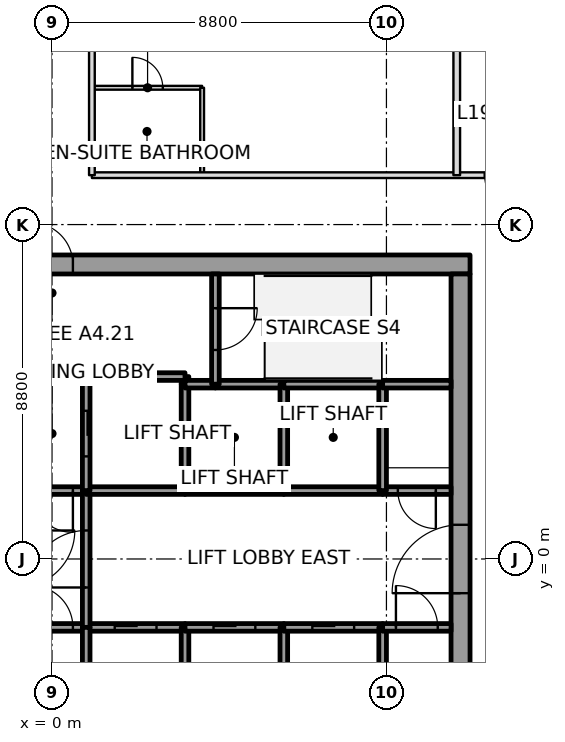
"""IFC4 building model, lengths in metres.
Left out: names, types, materials, properties, quantities, classifications, styles, units other than length and angle.
Written with IfcOpenShell. Run it as: python <this file> out.ifc"""

import sys

from ifc_helpers import new_model, si_unit, direction, frame, frame_2d, origin, place, context, subcontext, project, spatial, rectangle, extrude, element, fill, save


model = new_model("IFC4")
c1 = context("Model", 3, precision=1e-05, world=origin(), true_north=direction((0.0, 1.0)))
c2 = subcontext(c1, "Body", "Model", "MODEL_VIEW")
j1 = project(units=[si_unit("LENGTHUNIT", "METRE"), si_unit("PLANEANGLEUNIT", "RADIAN")], contexts=[c1])
p1 = place(None, origin())
s1 = spatial("IfcSite", under=j1, at=p1, CompositionType="ELEMENT")
p2 = place(p1, origin())
s2 = spatial("IfcBuilding", under=s1, at=p2, CompositionType="ELEMENT")
p3 = place(p2, frame((0.0, 0.0, 92.4)))
s3 = spatial("IfcBuildingStorey", under=s2, at=p3, CompositionType="ELEMENT", Elevation=92.4)
p4 = place(p3, frame((-11.0, 7.75, 0.0), z_axis=(0.0, 0.0, 1.0), x_axis=(1.0, 0.0, 0.0)))
e1 = element("IfcWall", 1, at=p4, inside=s3, PredefinedType="SHEAR", context=c2, shape_type="SweptSolid", body=[
    extrude(rectangle(XDim=22.0, YDim=0.5, at=frame_2d((11.0, 0.0))), origin(), (0.0, 0.0, 1.0), 3.7),
])
p5 = place(p4, frame((10.45, 0.0, 0.0)))
e2 = element("IfcOpeningElement", 2, at=p5, cuts=e1, PredefinedType="OPENING", context=c2, shape_type="SweptSolid", body=[
    extrude(rectangle(XDim=1.1, YDim=2.1, at=frame_2d((0.55, 1.05))), frame((0.0, 0.25, 0.0), z_axis=(0.0, -1.0, 0.0), x_axis=(1.0, 0.0, 0.0)), (0.0, 0.0, 1.0), 0.5),
])
p6 = place(p3, frame((10.75, -7.5, 0.0), z_axis=(0.0, 0.0, 1.0), x_axis=(0.0, 1.0, 0.0)))
e3 = element("IfcWall", 3, at=p6, inside=s3, PredefinedType="SHEAR", context=c2, shape_type="SweptSolid", body=[
    extrude(rectangle(XDim=15.0, YDim=0.5, at=frame_2d((7.5, 0.0))), origin(), (0.0, 0.0, 1.0), 3.7),
])
p7 = place(p6, frame((6.6, 0.0, 0.0)))
e4 = element("IfcOpeningElement", 4, at=p7, cuts=e3, PredefinedType="OPENING", context=c2, shape_type="SweptSolid", body=[
    extrude(rectangle(XDim=1.8, YDim=2.1, at=frame_2d((0.9, 1.05))), frame((0.0, 0.25, 0.0), z_axis=(0.0, -1.0, 0.0), x_axis=(1.0, 0.0, 0.0)), (0.0, 0.0, 1.0), 0.5),
])
p8 = place(p3, frame((-0.9, -1.8, 0.0), z_axis=(0.0, 0.0, 1.0), x_axis=(1.0, 0.0, 0.0)))
e5 = element("IfcWall", 5, at=p8, inside=s3, PredefinedType="SOLIDWALL", context=c2, shape_type="SweptSolid", body=[
    extrude(rectangle(XDim=1.8, YDim=0.2, at=frame_2d((0.9, 0.0))), origin(), (0.0, 0.0, 1.0), 3.55),
])
p9 = place(p8, frame((0.35, 0.0, 0.0)))
e6 = element("IfcOpeningElement", 6, at=p9, cuts=e5, PredefinedType="OPENING", context=c2, shape_type="SweptSolid", body=[
    extrude(rectangle(XDim=1.1, YDim=2.1, at=frame_2d((0.55, 1.05))), frame((0.0, 0.1, 0.0), z_axis=(0.0, -1.0, 0.0), x_axis=(1.0, 0.0, 0.0)), (0.0, 0.0, 1.0), 0.2),
])
p10 = place(p3, frame((0.9, 1.8, 0.0), z_axis=(0.0, 0.0, 1.0), x_axis=(-1.0, 0.0, 0.0)))
e7 = element("IfcWall", 7, at=p10, inside=s3, PredefinedType="SOLIDWALL", context=c2, shape_type="SweptSolid", body=[
    extrude(rectangle(XDim=1.8, YDim=0.2, at=frame_2d((0.9, 0.0))), origin(), (0.0, 0.0, 1.0), 3.55),
])
p11 = place(p10, frame((0.35, 0.0, 0.0)))
e8 = element("IfcOpeningElement", 8, at=p11, cuts=e7, PredefinedType="OPENING", context=c2, shape_type="SweptSolid", body=[
    extrude(rectangle(XDim=1.1, YDim=2.1, at=frame_2d((0.55, 1.05))), frame((0.0, 0.1, 0.0), z_axis=(0.0, -1.0, 0.0), x_axis=(1.0, 0.0, 0.0)), (0.0, 0.0, 1.0), 0.2),
])
p12 = place(p3, frame((0.9, -1.8, 0.0), z_axis=(0.0, 0.0, 1.0), x_axis=(1.0, 0.0, 0.0)))
e9 = element("IfcWall", 9, at=p12, inside=s3, PredefinedType="SOLIDWALL", context=c2, shape_type="SweptSolid", body=[
    extrude(rectangle(XDim=2.6, YDim=0.2, at=frame_2d((1.3, 0.0))), origin(), (0.0, 0.0, 1.0), 3.55),
])
p13 = place(p12, frame((0.75, 0.0, 0.0)))
e10 = element("IfcOpeningElement", 10, at=p13, cuts=e9, PredefinedType="OPENING", context=c2, shape_type="SweptSolid", body=[
    extrude(rectangle(XDim=1.1, YDim=2.1, at=frame_2d((0.55, 1.05))), frame((0.0, 0.1, 0.0), z_axis=(0.0, -1.0, 0.0), x_axis=(1.0, 0.0, 0.0)), (0.0, 0.0, 1.0), 0.2),
])
p14 = place(p3, frame((0.9, -1.8, 0.0), z_axis=(0.0, 0.0, 1.0), x_axis=(0.0, 1.0, 0.0)))
e11 = element("IfcWall", 11, at=p14, inside=s3, PredefinedType="SOLIDWALL", context=c2, shape_type="SweptSolid", body=[
    extrude(rectangle(XDim=3.6, YDim=0.2, at=frame_2d((1.8, 0.0))), origin(), (0.0, 0.0, 1.0), 3.55),
])
p15 = place(p14, frame((1.05, 0.0, 0.0)))
e12 = element("IfcOpeningElement", 12, at=p15, cuts=e11, PredefinedType="OPENING", context=c2, shape_type="SweptSolid", body=[
    extrude(rectangle(XDim=1.5, YDim=2.1, at=frame_2d((0.75, 1.05))), frame((0.0, 0.1, 0.0), z_axis=(0.0, -1.0, 0.0), x_axis=(1.0, 0.0, 0.0)), (0.0, 0.0, 1.0), 0.2),
])
p16 = place(p3, frame((0.9, -1.8, 0.0), z_axis=(0.0, 0.0, 1.0), x_axis=(0.0, -1.0, 0.0)))
e13 = element("IfcWall", 13, at=p16, inside=s3, PredefinedType="SOLIDWALL", context=c2, shape_type="SweptSolid", body=[
    extrude(rectangle(XDim=2.8, YDim=0.2, at=frame_2d((1.4, 0.0))), origin(), (0.0, 0.0, 1.0), 3.55),
])
p17 = place(p3, frame((3.5, 1.8, 0.0), z_axis=(0.0, 0.0, 1.0), x_axis=(-1.0, 0.0, 0.0)))
e14 = element("IfcWall", 14, at=p17, inside=s3, PredefinedType="SOLIDWALL", context=c2, shape_type="SweptSolid", body=[
    extrude(rectangle(XDim=2.6, YDim=0.2, at=frame_2d((1.3, 0.0))), origin(), (0.0, 0.0, 1.0), 3.55),
])
p18 = place(p3, frame((3.5, 4.6, 0.0), z_axis=(0.0, 0.0, 1.0), x_axis=(0.0, 1.0, 0.0)))
e15 = element("IfcWall", 15, at=p18, inside=s3, PredefinedType="SOLIDWALL", context=c2, shape_type="SweptSolid", body=[
    extrude(rectangle(XDim=0.2, YDim=0.2, at=frame_2d((0.1, 0.0))), origin(), (0.0, 0.0, 1.0), 3.55),
])
p19 = place(p3, frame((3.5, 4.8, 0.0), z_axis=(0.0, 0.0, 1.0), x_axis=(-1.0, 0.0, 0.0)))
e16 = element("IfcWall", 16, at=p19, inside=s3, PredefinedType="SOLIDWALL", context=c2, shape_type="SweptSolid", body=[
    extrude(rectangle(XDim=2.6, YDim=0.2, at=frame_2d((1.3, 0.0))), origin(), (0.0, 0.0, 1.0), 3.55),
])
p20 = place(p3, frame((0.9, 4.8, 0.0), z_axis=(0.0, 0.0, 1.0), x_axis=(0.0, -1.0, 0.0)))
e17 = element("IfcWall", 17, at=p20, inside=s3, PredefinedType="SOLIDWALL", context=c2, shape_type="SweptSolid", body=[
    extrude(rectangle(XDim=3.0, YDim=0.2, at=frame_2d((1.5, 0.0))), origin(), (0.0, 0.0, 1.0), 3.55),
])
p21 = place(p20, frame((0.9, 0.0, 0.0)))
e18 = element("IfcOpeningElement", 18, at=p21, cuts=e17, PredefinedType="OPENING", context=c2, shape_type="SweptSolid", body=[
    extrude(rectangle(XDim=1.2, YDim=2.1, at=frame_2d((0.6, 1.05))), frame((0.0, 0.1, 0.0), z_axis=(0.0, -1.0, 0.0), x_axis=(1.0, 0.0, 0.0)), (0.0, 0.0, 1.0), 0.2),
])
p22 = place(p3, frame((3.5, -4.6, 0.0), z_axis=(0.0, 0.0, 1.0), x_axis=(0.0, 1.0, 0.0)))
e19 = element("IfcWall", 19, at=p22, inside=s3, PredefinedType="SOLIDWALL", context=c2, shape_type="SweptSolid", body=[
    extrude(rectangle(XDim=2.8, YDim=0.2, at=frame_2d((1.4, 0.0))), origin(), (0.0, 0.0, 1.0), 3.55),
])
p23 = place(p3, frame((3.5, -1.8, 0.0), z_axis=(0.0, 0.0, 1.0), x_axis=(1.0, 0.0, 0.0)))
e20 = element("IfcWall", 20, at=p23, inside=s3, PredefinedType="SOLIDWALL", context=c2, shape_type="SweptSolid", body=[
    extrude(rectangle(XDim=2.6, YDim=0.2, at=frame_2d((1.3, 0.0))), origin(), (0.0, 0.0, 1.0), 3.55),
])
p24 = place(p23, frame((0.75, 0.0, 0.0)))
e21 = element("IfcOpeningElement", 21, at=p24, cuts=e20, PredefinedType="OPENING", context=c2, shape_type="SweptSolid", body=[
    extrude(rectangle(XDim=1.1, YDim=2.1, at=frame_2d((0.55, 1.05))), frame((0.0, 0.1, 0.0), z_axis=(0.0, -1.0, 0.0), x_axis=(1.0, 0.0, 0.0)), (0.0, 0.0, 1.0), 0.2),
])
p25 = place(p3, frame((6.1, 1.8, 0.0), z_axis=(0.0, 0.0, 1.0), x_axis=(-1.0, 0.0, 0.0)))
e22 = element("IfcWall", 22, at=p25, inside=s3, PredefinedType="SOLIDWALL", context=c2, shape_type="SweptSolid", body=[
    extrude(rectangle(XDim=2.6, YDim=0.2, at=frame_2d((1.3, 0.0))), origin(), (0.0, 0.0, 1.0), 3.55),
])
p26 = place(p3, frame((3.5, 1.8, 0.0), z_axis=(0.0, 0.0, 1.0), x_axis=(0.0, 1.0, 0.0)))
e23 = element("IfcWall", 23, at=p26, inside=s3, PredefinedType="SOLIDWALL", context=c2, shape_type="SweptSolid", body=[
    extrude(rectangle(XDim=2.8, YDim=0.2, at=frame_2d((1.4, 0.0))), origin(), (0.0, 0.0, 1.0), 3.55),
])
p27 = place(p3, frame((4.3, 4.6, 0.0), z_axis=(0.0, 0.0, 1.0), x_axis=(-1.0, 0.0, 0.0)))
e24 = element("IfcWall", 24, at=p27, inside=s3, PredefinedType="SOLIDWALL", context=c2, shape_type="SweptSolid", body=[
    extrude(rectangle(XDim=0.8, YDim=0.2, at=frame_2d((0.4, 0.0))), origin(), (0.0, 0.0, 1.0), 3.55),
])
p28 = place(p3, frame((6.1, 4.6, 0.0), z_axis=(0.0, 0.0, 1.0), x_axis=(-1.0, 0.0, 0.0)))
e25 = element("IfcWall", 25, at=p28, inside=s3, PredefinedType="SOLIDWALL", context=c2, shape_type="SweptSolid", body=[
    extrude(rectangle(XDim=1.8, YDim=0.2, at=frame_2d((0.9, 0.0))), origin(), (0.0, 0.0, 1.0), 3.55),
])
p29 = place(p3, frame((4.3, 7.5, 0.0), z_axis=(0.0, 0.0, 1.0), x_axis=(0.0, -1.0, 0.0)))
e26 = element("IfcWall", 26, at=p29, inside=s3, PredefinedType="SOLIDWALL", context=c2, shape_type="SweptSolid", body=[
    extrude(rectangle(XDim=2.9, YDim=0.2, at=frame_2d((1.45, 0.0))), origin(), (0.0, 0.0, 1.0), 3.55),
])
p30 = place(p29, frame((0.9, 0.0, 0.0)))
e27 = element("IfcOpeningElement", 27, at=p30, cuts=e26, PredefinedType="OPENING", context=c2, shape_type="SweptSolid", body=[
    extrude(rectangle(XDim=1.1, YDim=2.1, at=frame_2d((0.55, 1.05))), frame((0.0, 0.1, 0.0), z_axis=(0.0, -1.0, 0.0), x_axis=(1.0, 0.0, 0.0)), (0.0, 0.0, 1.0), 0.2),
])
p31 = place(p3, frame((6.1, -4.6, 0.0), z_axis=(0.0, 0.0, 1.0), x_axis=(0.0, 1.0, 0.0)))
e28 = element("IfcWall", 28, at=p31, inside=s3, PredefinedType="SOLIDWALL", context=c2, shape_type="SweptSolid", body=[
    extrude(rectangle(XDim=2.8, YDim=0.2, at=frame_2d((1.4, 0.0))), origin(), (0.0, 0.0, 1.0), 3.55),
])
p32 = place(p3, frame((6.1, -1.8, 0.0), z_axis=(0.0, 0.0, 1.0), x_axis=(1.0, 0.0, 0.0)))
e29 = element("IfcWall", 29, at=p32, inside=s3, PredefinedType="SOLIDWALL", context=c2, shape_type="SweptSolid", body=[
    extrude(rectangle(XDim=2.6, YDim=0.2, at=frame_2d((1.3, 0.0))), origin(), (0.0, 0.0, 1.0), 3.55),
])
p33 = place(p32, frame((0.75, 0.0, 0.0)))
e30 = element("IfcOpeningElement", 30, at=p33, cuts=e29, PredefinedType="OPENING", context=c2, shape_type="SweptSolid", body=[
    extrude(rectangle(XDim=1.1, YDim=2.1, at=frame_2d((0.55, 1.05))), frame((0.0, 0.1, 0.0), z_axis=(0.0, -1.0, 0.0), x_axis=(1.0, 0.0, 0.0)), (0.0, 0.0, 1.0), 0.2),
])
p34 = place(p3, frame((8.7, 1.8, 0.0), z_axis=(0.0, 0.0, 1.0), x_axis=(-1.0, 0.0, 0.0)))
e31 = element("IfcWall", 31, at=p34, inside=s3, PredefinedType="SOLIDWALL", context=c2, shape_type="SweptSolid", body=[
    extrude(rectangle(XDim=2.6, YDim=0.2, at=frame_2d((1.3, 0.0))), origin(), (0.0, 0.0, 1.0), 3.55),
])
p35 = place(p3, frame((6.1, 1.8, 0.0), z_axis=(0.0, 0.0, 1.0), x_axis=(0.0, 1.0, 0.0)))
e32 = element("IfcWall", 32, at=p35, inside=s3, PredefinedType="SOLIDWALL", context=c2, shape_type="SweptSolid", body=[
    extrude(rectangle(XDim=2.8, YDim=0.2, at=frame_2d((1.4, 0.0))), origin(), (0.0, 0.0, 1.0), 3.55),
])
p36 = place(p3, frame((8.7, 4.6, 0.0), z_axis=(0.0, 0.0, 1.0), x_axis=(-1.0, 0.0, 0.0)))
e33 = element("IfcWall", 33, at=p36, inside=s3, PredefinedType="SOLIDWALL", context=c2, shape_type="SweptSolid", body=[
    extrude(rectangle(XDim=2.6, YDim=0.2, at=frame_2d((1.3, 0.0))), origin(), (0.0, 0.0, 1.0), 3.55),
])
p37 = place(p3, frame((8.7, -1.8, 0.0), z_axis=(0.0, 0.0, 1.0), x_axis=(0.0, -1.0, 0.0)))
e34 = element("IfcWall", 34, at=p37, inside=s3, PredefinedType="SOLIDWALL", context=c2, shape_type="SweptSolid", body=[
    extrude(rectangle(XDim=2.8, YDim=0.2, at=frame_2d((1.4, 0.0))), origin(), (0.0, 0.0, 1.0), 3.55),
])
p38 = place(p3, frame((8.7, -1.8, 0.0), z_axis=(0.0, 0.0, 1.0), x_axis=(1.0, 0.0, 0.0)))
e35 = element("IfcWall", 35, at=p38, inside=s3, PredefinedType="SOLIDWALL", context=c2, shape_type="SweptSolid", body=[
    extrude(rectangle(XDim=1.8, YDim=0.2, at=frame_2d((0.9, 0.0))), origin(), (0.0, 0.0, 1.0), 3.55),
])
p39 = place(p38, frame((0.35, 0.0, 0.0)))
e36 = element("IfcOpeningElement", 36, at=p39, cuts=e35, PredefinedType="OPENING", context=c2, shape_type="SweptSolid", body=[
    extrude(rectangle(XDim=1.1, YDim=2.1, at=frame_2d((0.55, 1.05))), frame((0.0, 0.1, 0.0), z_axis=(0.0, -1.0, 0.0), x_axis=(1.0, 0.0, 0.0)), (0.0, 0.0, 1.0), 0.2),
])
p40 = place(p3, frame((10.5, 1.8, 0.0), z_axis=(0.0, 0.0, 1.0), x_axis=(-1.0, 0.0, 0.0)))
e37 = element("IfcWall", 37, at=p40, inside=s3, PredefinedType="SOLIDWALL", context=c2, shape_type="SweptSolid", body=[
    extrude(rectangle(XDim=1.8, YDim=0.2, at=frame_2d((0.9, 0.0))), origin(), (0.0, 0.0, 1.0), 3.55),
])
p41 = place(p40, frame((0.4, 0.0, 0.0)))
e38 = element("IfcOpeningElement", 38, at=p41, cuts=e37, PredefinedType="OPENING", context=c2, shape_type="SweptSolid", body=[
    extrude(rectangle(XDim=1.0, YDim=2.1, at=frame_2d((0.5, 1.05))), frame((0.0, 0.1, 0.0), z_axis=(0.0, -1.0, 0.0), x_axis=(1.0, 0.0, 0.0)), (0.0, 0.0, 1.0), 0.2),
])
p42 = place(p3, frame((8.7, 4.6, 0.0), z_axis=(0.0, 0.0, 1.0), x_axis=(0.0, -1.0, 0.0)))
e39 = element("IfcWall", 39, at=p42, inside=s3, PredefinedType="SOLIDWALL", context=c2, shape_type="SweptSolid", body=[
    extrude(rectangle(XDim=2.8, YDim=0.2, at=frame_2d((1.4, 0.0))), origin(), (0.0, 0.0, 1.0), 3.55),
])
p43 = place(p3, frame((10.5, 4.6, 0.0), z_axis=(0.0, 0.0, 1.0), x_axis=(-1.0, 0.0, 0.0)))
e40 = element("IfcWall", 40, at=p43, inside=s3, PredefinedType="SOLIDWALL", context=c2, shape_type="SweptSolid", body=[
    extrude(rectangle(XDim=1.8, YDim=0.2, at=frame_2d((0.9, 0.0))), origin(), (0.0, 0.0, 1.0), 3.55),
])
p44 = place(p3, frame((10.65, 25.124, 0.0), z_axis=(0.0, 0.0, 1.0), x_axis=(0.0, -1.0, 0.0)))
e41 = element("IfcWall", 41, at=p44, inside=s3, PredefinedType="PARTITIONING", context=c2, shape_type="SweptSolid", body=[
    extrude(rectangle(XDim=15.024, YDim=0.175, at=frame_2d((7.512, 0.0))), origin(), (0.0, 0.0, 1.0), 2.934),
])
p45 = place(p3, frame((13.02, 10.1, 0.0), z_axis=(0.0, 0.0, 1.0), x_axis=(-1.0, 0.0, 0.0)))
e42 = element("IfcWall", 42, at=p45, inside=s3, PredefinedType="PARTITIONING", context=c2, shape_type="SweptSolid", body=[
    extrude(rectangle(XDim=11.97, YDim=0.15, at=frame_2d((5.985, 0.0))), origin(), (0.0, 0.0, 1.0), 2.947),
])
p46 = place(p45, frame((0.635, 0.0, 0.0)))
e43 = element("IfcOpeningElement", 43, at=p46, cuts=e42, PredefinedType="OPENING", context=c2, shape_type="SweptSolid", body=[
    extrude(rectangle(XDim=1.0, YDim=2.1, at=frame_2d((0.5, 1.05))), frame((0.0, 0.075, 0.0), z_axis=(0.0, -1.0, 0.0), x_axis=(1.0, 0.0, 0.0)), (0.0, 0.0, 1.0), 0.15),
])
p47 = place(p3, frame((1.05, 10.1, 0.0), z_axis=(0.0, 0.0, 1.0), x_axis=(0.0, 1.0, 0.0)))
e44 = element("IfcWall", 44, at=p47, inside=s3, PredefinedType="PARTITIONING", context=c2, shape_type="SweptSolid", body=[
    extrude(rectangle(XDim=16.009, YDim=0.15, at=frame_2d((8.005, 0.0))), origin(), (0.0, 0.0, 1.0), 2.947),
])
p48 = place(p47, frame((6.495, 0.0, 0.0)))
e45 = element("IfcOpeningElement", 45, at=p48, cuts=e44, PredefinedType="OPENING", context=c2, shape_type="SweptSolid", body=[
    extrude(rectangle(XDim=1.0, YDim=2.1, at=frame_2d((0.5, 1.05))), frame((0.0, 0.075, 0.0), z_axis=(0.0, -1.0, 0.0), x_axis=(1.0, 0.0, 0.0)), (0.0, 0.0, 1.0), 0.15),
])
p49 = place(p3, frame((1.08, 12.4, 0.0), z_axis=(0.0, 0.0, 1.0), x_axis=(1.0, 0.0, 0.0)))
e46 = element("IfcWall", 46, at=p49, inside=s3, PredefinedType="PARTITIONING", context=c2, shape_type="SweptSolid", body=[
    extrude(rectangle(XDim=2.87, YDim=0.1, at=frame_2d((1.435, 0.0))), origin(), (0.0, 0.0, 1.0), 3.15),
])
p50 = place(p49, frame((1.035, 0.0, 0.0)))
e47 = element("IfcOpeningElement", 47, at=p50, cuts=e46, PredefinedType="OPENING", context=c2, shape_type="SweptSolid", body=[
    extrude(rectangle(XDim=0.8, YDim=2.1, at=frame_2d((0.4, 1.05))), frame((0.0, 0.05, 0.0), z_axis=(0.0, -1.0, 0.0), x_axis=(1.0, 0.0, 0.0)), (0.0, 0.0, 1.0), 0.1),
])
p51 = place(p3, frame((3.95, 12.4, 0.0), z_axis=(0.0, 0.0, 1.0), x_axis=(0.0, -1.0, 0.0)))
e48 = element("IfcWall", 48, at=p51, inside=s3, PredefinedType="PARTITIONING", context=c2, shape_type="SweptSolid", body=[
    extrude(rectangle(XDim=2.27, YDim=0.1, at=frame_2d((1.135, 0.0))), origin(), (0.0, 0.0, 1.0), 3.15),
])
p52 = place(p46, origin())
e49 = element("IfcDoor", 49, at=p52, inside=s3, OperationType="SINGLE_SWING_LEFT", PredefinedType="DOOR", context=c2, shape_type="SweptSolid", body=[
    extrude(rectangle(XDim=1.0, YDim=2.1, at=frame_2d((0.5, 1.05))), frame((0.0, 0.025, 0.0), z_axis=(0.0, -1.0, 0.0), x_axis=(1.0, 0.0, 0.0)), (0.0, 0.0, 1.0), 0.05),
])
fill(e43, e49)
p53 = place(p50, origin())
e50 = element("IfcDoor", 50, at=p53, inside=s3, OperationType="SINGLE_SWING_RIGHT", PredefinedType="DOOR", context=c2, shape_type="SweptSolid", body=[
    extrude(rectangle(XDim=0.8, YDim=2.1, at=frame_2d((0.4, 1.05))), frame((0.0, 0.025, 0.0), z_axis=(0.0, -1.0, 0.0), x_axis=(1.0, 0.0, 0.0)), (0.0, 0.0, 1.0), 0.05),
])
fill(e47, e50)
p54 = place(p13, origin())
e51 = element("IfcDoor", 51, at=p54, inside=s3, OperationType="SLIDING_TO_RIGHT", PredefinedType="DOOR", context=c2, shape_type="SweptSolid", body=[
    extrude(rectangle(XDim=1.1, YDim=2.1, at=frame_2d((0.55, 1.05))), frame((0.0, 0.025, 0.0), z_axis=(0.0, -1.0, 0.0), x_axis=(1.0, 0.0, 0.0)), (0.0, 0.0, 1.0), 0.05),
])
fill(e10, e51)
p55 = place(p24, origin())
e52 = element("IfcDoor", 52, at=p55, inside=s3, OperationType="SLIDING_TO_RIGHT", PredefinedType="DOOR", context=c2, shape_type="SweptSolid", body=[
    extrude(rectangle(XDim=1.1, YDim=2.1, at=frame_2d((0.55, 1.05))), frame((0.0, 0.025, 0.0), z_axis=(0.0, -1.0, 0.0), x_axis=(1.0, 0.0, 0.0)), (0.0, 0.0, 1.0), 0.05),
])
fill(e21, e52)
p56 = place(p33, origin())
e53 = element("IfcDoor", 53, at=p56, inside=s3, OperationType="SLIDING_TO_LEFT", PredefinedType="DOOR", context=c2, shape_type="SweptSolid", body=[
    extrude(rectangle(XDim=1.1, YDim=2.1, at=frame_2d((0.55, 1.05))), frame((0.0, 0.025, 0.0), z_axis=(0.0, -1.0, 0.0), x_axis=(1.0, 0.0, 0.0)), (0.0, 0.0, 1.0), 0.05),
])
fill(e30, e53)
p57 = place(p21, origin())
e54 = element("IfcDoor", 54, at=p57, inside=s3, OperationType="SLIDING_TO_LEFT", PredefinedType="DOOR", context=c2, shape_type="SweptSolid", body=[
    extrude(rectangle(XDim=1.2, YDim=2.1, at=frame_2d((0.6, 1.05))), frame((0.0, 0.025, 0.0), z_axis=(0.0, -1.0, 0.0), x_axis=(1.0, 0.0, 0.0)), (0.0, 0.0, 1.0), 0.05),
])
fill(e18, e54)
p58 = place(p15, origin())
e55 = element("IfcDoor", 55, at=p58, inside=s3, OperationType="DOUBLE_DOOR_SINGLE_SWING", PredefinedType="DOOR", context=c2, shape_type="SweptSolid", body=[
    extrude(rectangle(XDim=1.5, YDim=2.1, at=frame_2d((0.75, 1.05))), frame((0.0, 0.025, 0.0), z_axis=(0.0, -1.0, 0.0), x_axis=(1.0, 0.0, 0.0)), (0.0, 0.0, 1.0), 0.05),
])
fill(e12, e55)
p59 = place(p39, origin())
e56 = element("IfcDoor", 56, at=p59, inside=s3, OperationType="SINGLE_SWING_RIGHT", PredefinedType="DOOR", context=c2, shape_type="SweptSolid", body=[
    extrude(rectangle(XDim=1.1, YDim=2.1, at=frame_2d((0.55, 1.05))), frame((0.0, 0.025, 0.0), z_axis=(0.0, -1.0, 0.0), x_axis=(1.0, 0.0, 0.0)), (0.0, 0.0, 1.0), 0.05),
])
fill(e36, e56)
p60 = place(p11, origin())
e57 = element("IfcDoor", 57, at=p60, inside=s3, OperationType="SINGLE_SWING_RIGHT", PredefinedType="DOOR", context=c2, shape_type="SweptSolid", body=[
    extrude(rectangle(XDim=1.1, YDim=2.1, at=frame_2d((0.55, 1.05))), frame((0.0, 0.025, 0.0), z_axis=(0.0, -1.0, 0.0), x_axis=(1.0, 0.0, 0.0)), (0.0, 0.0, 1.0), 0.05),
])
fill(e8, e57)
p61 = place(p9, origin())
e58 = element("IfcDoor", 58, at=p61, inside=s3, OperationType="SINGLE_SWING_RIGHT", PredefinedType="DOOR", context=c2, shape_type="SweptSolid", body=[
    extrude(rectangle(XDim=1.1, YDim=2.1, at=frame_2d((0.55, 1.05))), frame((0.0, 0.025, 0.0), z_axis=(0.0, -1.0, 0.0), x_axis=(1.0, 0.0, 0.0)), (0.0, 0.0, 1.0), 0.05),
])
fill(e6, e58)
p62 = place(p41, origin())
e59 = element("IfcDoor", 59, at=p62, inside=s3, OperationType="SINGLE_SWING_RIGHT", PredefinedType="DOOR", context=c2, shape_type="SweptSolid", body=[
    extrude(rectangle(XDim=1.0, YDim=2.1, at=frame_2d((0.5, 1.05))), frame((0.0, 0.025, 0.0), z_axis=(0.0, -1.0, 0.0), x_axis=(1.0, 0.0, 0.0)), (0.0, 0.0, 1.0), 0.05),
])
fill(e38, e59)
p63 = place(p30, origin())
e60 = element("IfcDoor", 60, at=p63, inside=s3, OperationType="SINGLE_SWING_LEFT", PredefinedType="DOOR", context=c2, shape_type="SweptSolid", body=[
    extrude(rectangle(XDim=1.1, YDim=2.1, at=frame_2d((0.55, 1.05))), frame((0.0, 0.025, 0.0), z_axis=(0.0, -1.0, 0.0), x_axis=(1.0, 0.0, 0.0)), (0.0, 0.0, 1.0), 0.05),
])
fill(e27, e60)
p64 = place(p7, origin())
e61 = element("IfcDoor", 61, at=p64, inside=s3, OperationType="DOUBLE_DOOR_SINGLE_SWING", PredefinedType="DOOR", context=c2, shape_type="SweptSolid", body=[
    extrude(rectangle(XDim=1.8, YDim=2.1, at=frame_2d((0.9, 1.05))), frame((0.0, 0.025, 0.0), z_axis=(0.0, -1.0, 0.0), x_axis=(1.0, 0.0, 0.0)), (0.0, 0.0, 1.0), 0.05),
])
fill(e4, e61)
p65 = place(p5, origin())
e62 = element("IfcDoor", 62, at=p65, inside=s3, OperationType="SINGLE_SWING_LEFT", PredefinedType="DOOR", context=c2, shape_type="SweptSolid", body=[
    extrude(rectangle(XDim=1.1, YDim=2.1, at=frame_2d((0.55, 1.05))), frame((0.0, 0.025, 0.0), z_axis=(0.0, -1.0, 0.0), x_axis=(1.0, 0.0, 0.0)), (0.0, 0.0, 1.0), 0.05),
])
fill(e2, e62)
save(model, sys.argv[1])
